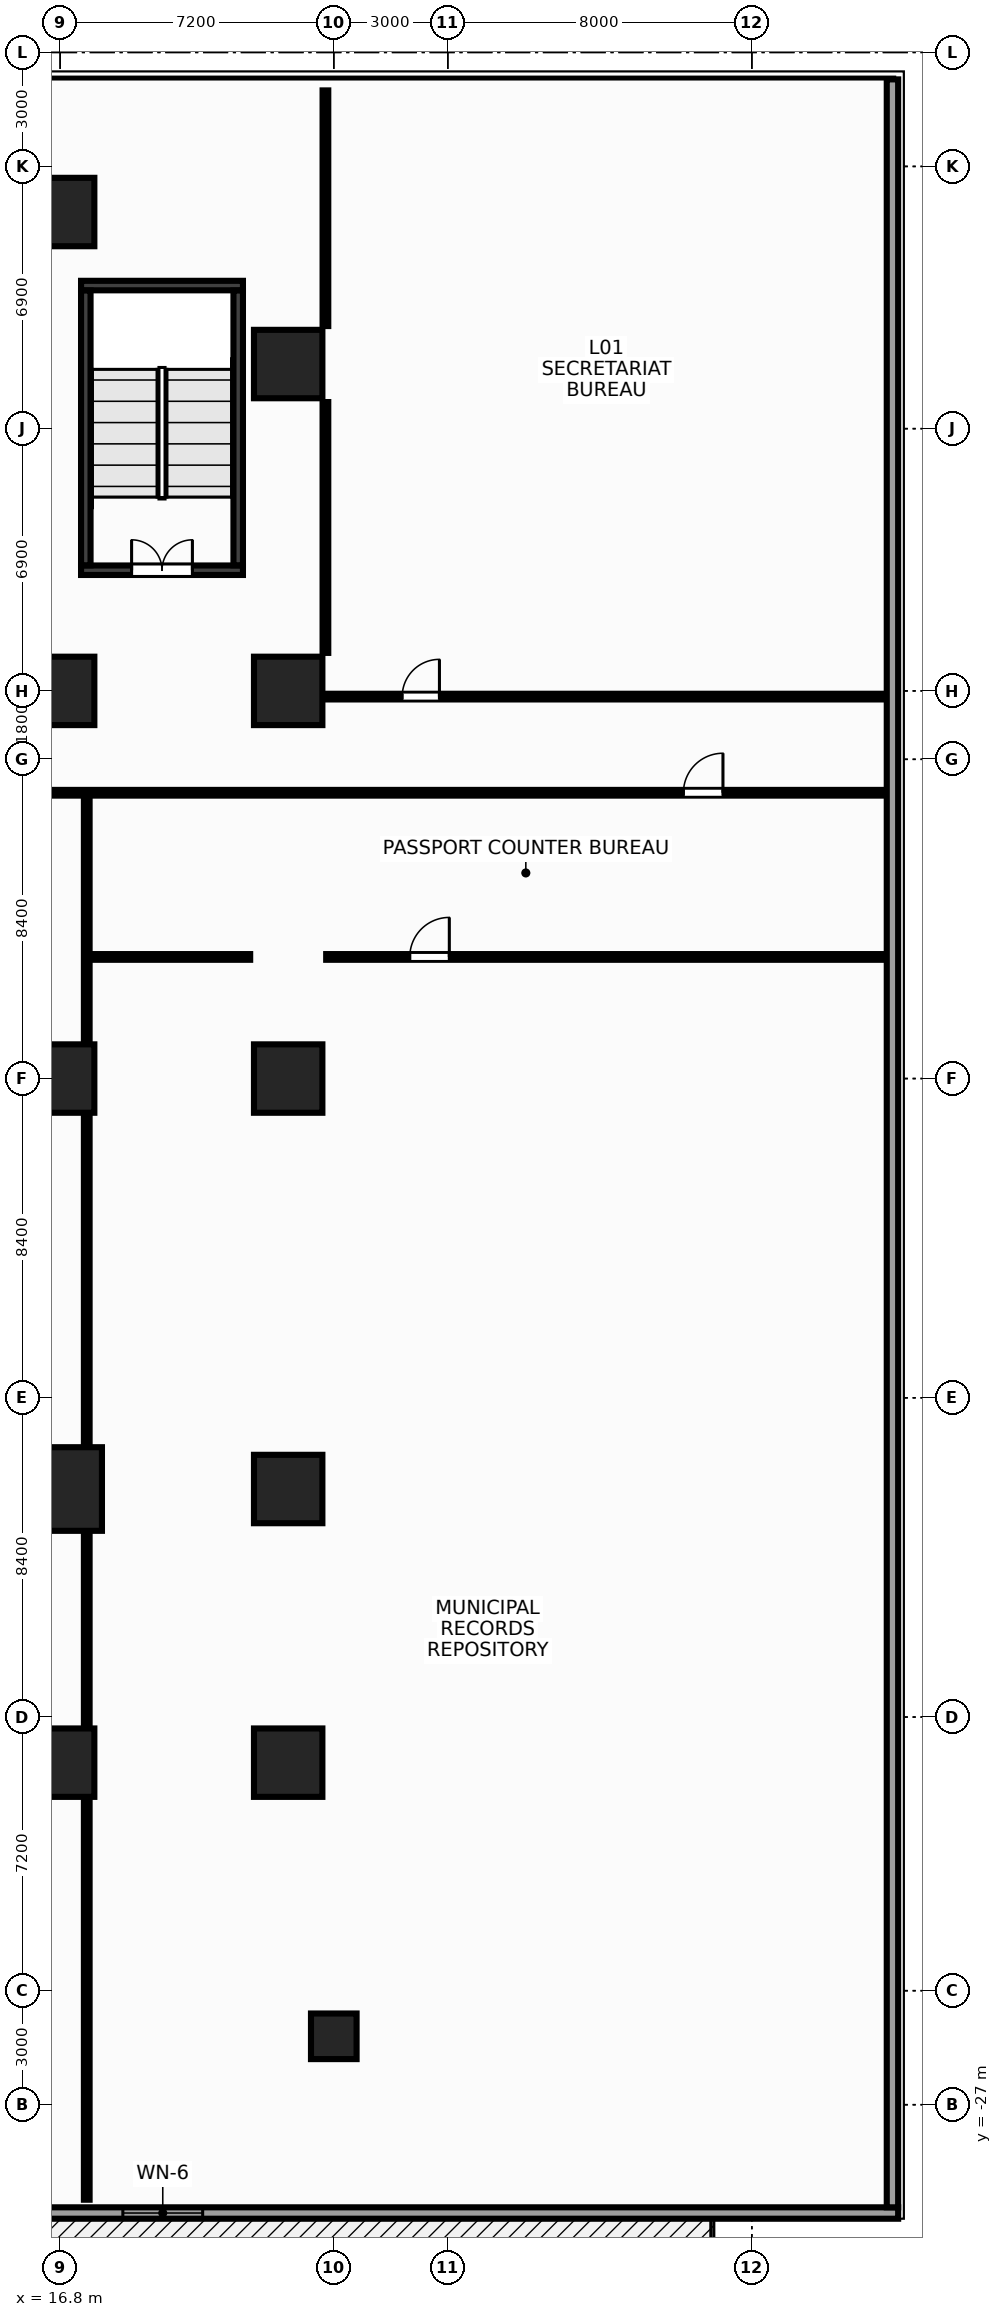
"""IFC4 building model, lengths in metres.
Left out: names, types, materials, properties, quantities, classifications, styles, units other than length and angle.
Written with IfcOpenShell. Run it as: python <this file> out.ifc"""

import sys

from ifc_helpers import new_model, si_unit, direction, frame, frame_2d, origin, origin_2d, place, context, subcontext, project, spatial, rectangle, hollow_rectangle, extrude, source, transform, mapped, element, fill, save


model = new_model("IFC4")
c1 = context("Model", 3, precision=1e-05, world=origin(), true_north=direction((0.0, 1.0)))
c2 = subcontext(c1, "Body", "Model", "MODEL_VIEW")
j1 = project(units=[si_unit("LENGTHUNIT", "METRE"), si_unit("PLANEANGLEUNIT", "RADIAN")], contexts=[c1])
p1 = place(None, origin())
s1 = spatial("IfcSite", under=j1, at=p1, CompositionType="ELEMENT")
p2 = place(p1, origin())
s2 = spatial("IfcBuilding", under=s1, at=p2, CompositionType="ELEMENT")
p3 = place(p2, frame((0.0, 0.0, 5.0)))
s3 = spatial("IfcBuildingStorey", under=s2, at=p3, CompositionType="ELEMENT", Elevation=5.0)
m1 = source(origin(), c2, "Body", "SweptSolid", [
    extrude(rectangle(XDim=4.26, YDim=0.25, at=frame_2d((2.13, 0.0))), origin(), (0.0, 0.0, 1.0), 4.65),
])
p4 = place(p3, frame((17.35, 20.865, 0.0), z_axis=(0.0, 0.0, 1.0), x_axis=(1.0, 0.0, 0.0)))
e1 = element("IfcWall", 1, at=p4, inside=s3, PredefinedType="SHEAR", context=c2, shape_type="MappedRepresentation", body=[
    mapped(m1, transform((0.0, 0.0, 0.0), x_axis=(1.0, 0.0, 0.0), y_axis=(0.0, 1.0, 0.0), z_axis=(0.0, 0.0, 1.0), scale=1.0)),
])
p5 = place(p3, frame((17.35, 13.375, 0.0), z_axis=(0.0, 0.0, 1.0), x_axis=(1.0, 0.0, 0.0)))
e2 = element("IfcWall", 2, at=p5, inside=s3, PredefinedType="SHEAR", context=c2, shape_type="MappedRepresentation", body=[
    mapped(m1, transform((0.0, 0.0, 0.0), x_axis=(1.0, 0.0, 0.0), y_axis=(0.0, 1.0, 0.0), z_axis=(0.0, 0.0, 1.0), scale=1.0)),
])
p6 = place(p5, frame((1.33, 0.0, 0.0)))
e3 = element("IfcOpeningElement", 3, at=p6, cuts=e2, PredefinedType="OPENING", context=c2, shape_type="SweptSolid", body=[
    extrude(rectangle(XDim=1.6, YDim=2.15, at=frame_2d((0.8, 1.075))), frame((0.0, 0.137, 0.0), z_axis=(0.0, -1.0, 0.0), x_axis=(1.0, 0.0, 0.0)), (0.0, 0.0, 1.0), 0.274),
])
m2 = source(origin(), c2, "Body", "SweptSolid", [
    extrude(rectangle(XDim=7.23, YDim=0.25, at=frame_2d((3.615, 0.0))), origin(), (0.0, 0.0, 1.0), 4.65),
])
for number, where, z_axis, x_axis in (
    (4, (17.475, 13.505, 0.0), (0.0, 0.0, 1.0), (0.0, 1.0, 0.0)),
    (5, (21.485, 13.505, 0.0), (0.0, 0.0, 1.0), (0.0, 1.0, 0.0)),
):
    element("IfcWall", number, at=place(p3, frame(where, z_axis=z_axis, x_axis=x_axis)), inside=s3, PredefinedType="SHEAR", context=c2, shape_type="MappedRepresentation", body=[
        mapped(m2, transform((0.0, 0.0, 0.0), x_axis=(1.0, 0.0, 0.0), y_axis=(0.0, 1.0, 0.0), z_axis=(0.0, 0.0, 1.0), scale=1.0)),
    ])
m3 = source(origin(), c2, "Body", "SweptSolid", [
    extrude(hollow_rectangle(XDim=1.2, YDim=1.2, WallThickness=0.055, at=origin_2d()), origin(), (0.0, 0.0, 1.0), 4.65),
])
p7 = place(p3, frame((24.0, -25.2, 0.0), z_axis=(0.0, 0.0, 1.0), x_axis=(1.0, 0.0, 0.0)))
e6 = element("IfcColumn", 6, at=p7, inside=s3, PredefinedType="COLUMN", context=c2, shape_type="MappedRepresentation", body=[
    mapped(m3, transform((0.0, 0.0, 0.0), x_axis=(1.0, 0.0, 0.0), y_axis=(0.0, 1.0, 0.0), z_axis=(0.0, 0.0, 1.0), scale=1.0)),
])
m4 = source(origin(), c2, "Body", "SweptSolid", [
    extrude(rectangle(XDim=1.8, YDim=1.8, at=origin_2d()), origin(), (0.0, 0.0, 1.0), 4.65),
])
p8 = place(p3, frame((16.8, -18.0, 0.0), z_axis=(0.0, 0.0, 1.0), x_axis=(1.0, 0.0, 0.0)))
e7 = element("IfcColumn", 7, at=p8, inside=s3, PredefinedType="COLUMN", context=c2, shape_type="MappedRepresentation", body=[
    mapped(m4, transform((0.0, 0.0, 0.0), x_axis=(1.0, 0.0, 0.0), y_axis=(0.0, 1.0, 0.0), z_axis=(0.0, 0.0, 1.0), scale=1.0)),
])
m5 = source(origin(), c2, "Body", "SweptSolid", [
    extrude(rectangle(XDim=2.2, YDim=2.2, at=origin_2d()), origin(), (0.0, 0.0, 1.0), 4.65),
])
p9 = place(p3, frame((16.8, -10.8, 0.0), z_axis=(0.0, 0.0, 1.0), x_axis=(1.0, 0.0, 0.0)))
e8 = element("IfcColumn", 8, at=p9, inside=s3, PredefinedType="COLUMN", context=c2, shape_type="MappedRepresentation", body=[
    mapped(m5, transform((0.0, 0.0, 0.0), x_axis=(1.0, 0.0, 0.0), y_axis=(0.0, 1.0, 0.0), z_axis=(0.0, 0.0, 1.0), scale=1.0)),
])
for number, where, z_axis, x_axis in (
    (9, (16.8, 0.0, 0.0), (0.0, 0.0, 1.0), (1.0, 0.0, 0.0)),
    (10, (16.8, 10.2, 0.0), (0.0, 0.0, 1.0), (1.0, 0.0, 0.0)),
    (11, (16.8, 22.8, 0.0), (0.0, 0.0, 1.0), (1.0, 0.0, 0.0)),
    (12, (22.8, -18.0, 0.0), (0.0, 0.0, 1.0), (1.0, 0.0, 0.0)),
    (13, (22.8, -10.8, 0.0), (0.0, 0.0, 1.0), (1.0, 0.0, 0.0)),
    (14, (22.8, 0.0, 0.0), (0.0, 0.0, 1.0), (1.0, 0.0, 0.0)),
    (15, (22.8, 10.2, 0.0), (0.0, 0.0, 1.0), (1.0, 0.0, 0.0)),
    (16, (22.8, 18.8, 0.0), (0.0, 0.0, 1.0), (1.0, 0.0, 0.0)),
):
    element("IfcColumn", number, at=place(p3, frame(where, z_axis=z_axis, x_axis=x_axis)), inside=s3, PredefinedType="COLUMN", context=c2, shape_type="MappedRepresentation", body=[
        mapped(m4, transform((0.0, 0.0, 0.0), x_axis=(1.0, 0.0, 0.0), y_axis=(0.0, 1.0, 0.0), z_axis=(0.0, 0.0, 1.0), scale=1.0)),
    ])
m6 = source(origin(), c2, "Body", "SweptSolid", [
    extrude(rectangle(XDim=77.7, YDim=0.3, at=frame_2d((38.85, 0.0))), origin(), (0.0, 0.0, 1.0), 3.87),
])
p10 = place(p3, frame((38.85, -29.85, 0.0), z_axis=(0.0, 0.0, 1.0), x_axis=(-1.0, 0.0, 0.0)))
e17 = element("IfcWall", 17, at=p10, inside=s3, PredefinedType="STANDARD", context=c2, shape_type="MappedRepresentation", body=[
    mapped(m6, transform((0.0, 0.0, 0.0), x_axis=(1.0, 0.0, 0.0), y_axis=(0.0, 1.0, 0.0), z_axis=(0.0, 0.0, 1.0), scale=1.0)),
])
p11 = place(p10, frame((18.3, 0.0, 0.9)))
e18 = element("IfcOpeningElement", 18, at=p11, cuts=e17, PredefinedType="OPENING", context=c2, shape_type="SweptSolid", body=[
    extrude(rectangle(XDim=2.1, YDim=2.3, at=frame_2d((1.05, 1.15))), frame((0.0, 0.162, 0.0), z_axis=(0.0, -1.0, 0.0), x_axis=(1.0, 0.0, 0.0)), (0.0, 0.0, 1.0), 0.324),
])
p12 = place(p10, frame((24.8, 0.0, 0.9)))
e19 = element("IfcOpeningElement", 19, at=p12, cuts=e17, PredefinedType="OPENING", context=c2, shape_type="SweptSolid", body=[
    extrude(rectangle(XDim=2.1, YDim=2.3, at=frame_2d((1.05, 1.15))), frame((0.0, 0.162, 0.0), z_axis=(0.0, -1.0, 0.0), x_axis=(1.0, 0.0, 0.0)), (0.0, 0.0, 1.0), 0.324),
])
p13 = place(p10, frame((50.8, 0.0, 0.9)))
e20 = element("IfcOpeningElement", 20, at=p13, cuts=e17, PredefinedType="OPENING", context=c2, shape_type="SweptSolid", body=[
    extrude(rectangle(XDim=2.1, YDim=2.3, at=frame_2d((1.05, 1.15))), frame((0.0, 0.162, 0.0), z_axis=(0.0, -1.0, 0.0), x_axis=(1.0, 0.0, 0.0)), (0.0, 0.0, 1.0), 0.324),
])
p14 = place(p10, frame((57.3, 0.0, 0.9)))
e21 = element("IfcOpeningElement", 21, at=p14, cuts=e17, PredefinedType="OPENING", context=c2, shape_type="SweptSolid", body=[
    extrude(rectangle(XDim=2.1, YDim=2.3, at=frame_2d((1.05, 1.15))), frame((0.0, 0.162, 0.0), z_axis=(0.0, -1.0, 0.0), x_axis=(1.0, 0.0, 0.0)), (0.0, 0.0, 1.0), 0.324),
])
p15 = place(p10, frame((34.35, 0.0, 0.0)))
e22 = element("IfcOpeningElement", 22, at=p15, cuts=e17, PredefinedType="OPENING", context=c2, shape_type="SweptSolid", body=[
    extrude(rectangle(XDim=1.8, YDim=2.2, at=frame_2d((0.9, 1.1))), frame((0.0, 0.162, 0.0), z_axis=(0.0, -1.0, 0.0), x_axis=(1.0, 0.0, 0.0)), (0.0, 0.0, 1.0), 0.324),
])
p16 = place(p10, frame((42.35, 0.0, 0.0)))
e23 = element("IfcOpeningElement", 23, at=p16, cuts=e17, PredefinedType="OPENING", context=c2, shape_type="SweptSolid", body=[
    extrude(rectangle(XDim=1.8, YDim=2.2, at=frame_2d((0.9, 1.1))), frame((0.0, 0.162, 0.0), z_axis=(0.0, -1.0, 0.0), x_axis=(1.0, 0.0, 0.0)), (0.0, 0.0, 1.0), 0.324),
])
m7 = source(origin(), c2, "Body", "SweptSolid", [
    extrude(rectangle(XDim=55.99, YDim=0.3, at=frame_2d((27.995, 0.0))), origin(), (0.0, 0.0, 1.0), 3.87),
])
p17 = place(p3, frame((38.7, 26.29, 0.0), z_axis=(0.0, 0.0, 1.0), x_axis=(0.0, -1.0, 0.0)))
e24 = element("IfcWall", 24, at=p17, inside=s3, PredefinedType="STANDARD", context=c2, shape_type="MappedRepresentation", body=[
    mapped(m7, transform((0.0, 0.0, 0.0), x_axis=(1.0, 0.0, 0.0), y_axis=(0.0, 1.0, 0.0), z_axis=(0.0, 0.0, 1.0), scale=1.0)),
])
m8 = source(origin(), c2, "Body", "SweptSolid", [
    extrude(rectangle(XDim=77.0, YDim=0.15, at=frame_2d((38.5, 0.0))), origin(), (0.0, 0.0, 1.0), 3.755),
])
p18 = place(p3, frame((-38.5, 7.52, 0.0), z_axis=(0.0, 0.0, 1.0), x_axis=(1.0, 0.0, 0.0)))
e25 = element("IfcWall", 25, at=p18, inside=s3, PredefinedType="PARTITIONING", context=c2, shape_type="MappedRepresentation", body=[
    mapped(m8, transform((0.0, 0.0, 0.0), x_axis=(1.0, 0.0, 0.0), y_axis=(0.0, 1.0, 0.0), z_axis=(0.0, 0.0, 1.0), scale=1.0)),
])
p19 = place(p18, frame((4.2, 0.0, 0.0)))
e26 = element("IfcOpeningElement", 26, at=p19, cuts=e25, PredefinedType="OPENING", context=c2, shape_type="SweptSolid", body=[
    extrude(rectangle(XDim=1.04, YDim=2.2, at=frame_2d((0.52, 1.1))), frame((0.0, 0.087, 0.0), z_axis=(0.0, -1.0, 0.0), x_axis=(1.0, 0.0, 0.0)), (0.0, 0.0, 1.0), 0.174),
])
p20 = place(p18, frame((37.7, 0.0, 0.0)))
e27 = element("IfcOpeningElement", 27, at=p20, cuts=e25, PredefinedType="OPENING", context=c2, shape_type="SweptSolid", body=[
    extrude(rectangle(XDim=1.65, YDim=2.35, at=frame_2d((0.825, 1.175))), frame((0.0, 0.087, 0.0), z_axis=(0.0, -1.0, 0.0), x_axis=(1.0, 0.0, 0.0)), (0.0, 0.0, 1.0), 0.174),
])
p21 = place(p18, frame((71.7, 0.0, 0.0)))
e28 = element("IfcOpeningElement", 28, at=p21, cuts=e25, PredefinedType="OPENING", context=c2, shape_type="SweptSolid", body=[
    extrude(rectangle(XDim=1.04, YDim=2.2, at=frame_2d((0.52, 1.1))), frame((0.0, 0.087, 0.0), z_axis=(0.0, -1.0, 0.0), x_axis=(1.0, 0.0, 0.0)), (0.0, 0.0, 1.0), 0.174),
])
m9 = source(origin(), c2, "Body", "SweptSolid", [
    extrude(rectangle(XDim=14.7, YDim=0.15, at=frame_2d((7.35, 0.0))), origin(), (0.0, 0.0, 1.0), 4.37),
])
p22 = place(p3, frame((23.8, 10.05, 0.0), z_axis=(0.0, 0.0, 1.0), x_axis=(1.0, 0.0, 0.0)))
e29 = element("IfcWall", 29, at=p22, inside=s3, PredefinedType="PARTITIONING", context=c2, shape_type="MappedRepresentation", body=[
    mapped(m9, transform((0.0, 0.0, 0.0), x_axis=(1.0, 0.0, 0.0), y_axis=(0.0, 1.0, 0.0), z_axis=(0.0, 0.0, 1.0), scale=1.0)),
])
p23 = place(p22, frame((2.0, 0.0, 0.0)))
e30 = element("IfcOpeningElement", 30, at=p23, cuts=e29, PredefinedType="OPENING", context=c2, shape_type="SweptSolid", body=[
    extrude(rectangle(XDim=0.98, YDim=2.15, at=frame_2d((0.49, 1.075))), frame((0.0, 0.087, 0.0), z_axis=(0.0, -1.0, 0.0), x_axis=(1.0, 0.0, 0.0)), (0.0, 0.0, 1.0), 0.174),
])
m10 = source(origin(), c2, "Body", "SweptSolid", [
    extrude(rectangle(XDim=6.6, YDim=0.15, at=frame_2d((3.3, 0.0))), origin(), (0.0, 0.0, 1.0), 4.37),
])
p24 = place(p3, frame((23.78, 11.2, 0.0), z_axis=(0.0, 0.0, 1.0), x_axis=(0.0, 1.0, 0.0)))
e31 = element("IfcWall", 31, at=p24, inside=s3, PredefinedType="PARTITIONING", context=c2, shape_type="MappedRepresentation", body=[
    mapped(m10, transform((0.0, 0.0, 0.0), x_axis=(1.0, 0.0, 0.0), y_axis=(0.0, 1.0, 0.0), z_axis=(0.0, 0.0, 1.0), scale=1.0)),
])
m11 = source(origin(), c2, "Body", "SweptSolid", [
    extrude(rectangle(XDim=6.2, YDim=0.15, at=frame_2d((3.1, 0.0))), origin(), (0.0, 0.0, 1.0), 4.37),
])
p25 = place(p3, frame((23.78, 19.8, 0.0), z_axis=(0.0, 0.0, 1.0), x_axis=(0.0, 1.0, 0.0)))
e32 = element("IfcWall", 32, at=p25, inside=s3, PredefinedType="PARTITIONING", context=c2, shape_type="MappedRepresentation", body=[
    mapped(m11, transform((0.0, 0.0, 0.0), x_axis=(1.0, 0.0, 0.0), y_axis=(0.0, 1.0, 0.0), z_axis=(0.0, 0.0, 1.0), scale=1.0)),
])
m12 = source(origin(), c2, "Body", "SweptSolid", [
    extrude(rectangle(XDim=36.88, YDim=0.15, at=frame_2d((18.44, 0.0))), origin(), (0.0, 0.0, 1.0), 3.655),
])
p26 = place(p3, frame((17.5, -29.5, 0.0), z_axis=(0.0, 0.0, 1.0), x_axis=(0.0, 1.0, 0.0)))
e33 = element("IfcWall", 33, at=p26, inside=s3, PredefinedType="PARTITIONING", context=c2, shape_type="MappedRepresentation", body=[
    mapped(m12, transform((0.0, 0.0, 0.0), x_axis=(1.0, 0.0, 0.0), y_axis=(0.0, 1.0, 0.0), z_axis=(0.0, 0.0, 1.0), scale=1.0)),
])
m13 = source(origin(), c2, "Body", "SweptSolid", [
    extrude(rectangle(XDim=4.18, YDim=0.15, at=frame_2d((2.09, 0.0))), origin(), (0.0, 0.0, 1.0), 4.37),
])
p27 = place(p3, frame((17.62, 3.2, 0.0), z_axis=(0.0, 0.0, 1.0), x_axis=(1.0, 0.0, 0.0)))
e34 = element("IfcWall", 34, at=p27, inside=s3, PredefinedType="PARTITIONING", context=c2, shape_type="MappedRepresentation", body=[
    mapped(m13, transform((0.0, 0.0, 0.0), x_axis=(1.0, 0.0, 0.0), y_axis=(0.0, 1.0, 0.0), z_axis=(0.0, 0.0, 1.0), scale=1.0)),
])
p28 = place(p3, frame((23.8, 3.2, 0.0), z_axis=(0.0, 0.0, 1.0), x_axis=(1.0, 0.0, 0.0)))
e35 = element("IfcWall", 35, at=p28, inside=s3, PredefinedType="PARTITIONING", context=c2, shape_type="MappedRepresentation", body=[
    mapped(m9, transform((0.0, 0.0, 0.0), x_axis=(1.0, 0.0, 0.0), y_axis=(0.0, 1.0, 0.0), z_axis=(0.0, 0.0, 1.0), scale=1.0)),
])
p29 = place(p28, frame((2.2, 0.0, 0.0)))
e36 = element("IfcOpeningElement", 36, at=p29, cuts=e35, PredefinedType="OPENING", context=c2, shape_type="SweptSolid", body=[
    extrude(rectangle(XDim=1.04, YDim=2.2, at=frame_2d((0.52, 1.1))), frame((0.0, 0.087, 0.0), z_axis=(0.0, -1.0, 0.0), x_axis=(1.0, 0.0, 0.0)), (0.0, 0.0, 1.0), 0.174),
])
m14 = source(origin(), c2, "Body", "SweptSolid", [
    extrude(rectangle(XDim=2.1, YDim=2.3, at=frame_2d((1.05, 1.15))), frame((0.0, 0.03, 0.0), z_axis=(0.0, -1.0, 0.0), x_axis=(1.0, 0.0, 0.0)), (0.0, 0.0, 1.0), 0.06),
])
p30 = place(p11, origin())
e37 = element("IfcWindow", 37, at=p30, inside=s3, PartitioningType="SINGLE_PANEL", PredefinedType="WINDOW", context=c2, shape_type="MappedRepresentation", body=[
    mapped(m14, transform((0.0, 0.0, 0.0), x_axis=(1.0, 0.0, 0.0), y_axis=(0.0, 1.0, 0.0), z_axis=(0.0, 0.0, 1.0), scale=1.0)),
])
fill(e18, e37)
m15 = source(origin(), c2, "Body", "SweptSolid", [
    extrude(rectangle(XDim=1.6, YDim=2.15, at=frame_2d((0.8, 1.075))), frame((0.0, 0.025, 0.0), z_axis=(0.0, -1.0, 0.0), x_axis=(1.0, 0.0, 0.0)), (0.0, 0.0, 1.0), 0.05),
])
p31 = place(p6, origin())
e38 = element("IfcDoor", 38, at=p31, inside=s3, OperationType="DOUBLE_DOOR_SINGLE_SWING", PredefinedType="DOOR", context=c2, shape_type="MappedRepresentation", body=[
    mapped(m15, transform((0.0, 0.0, 0.0), x_axis=(1.0, 0.0, 0.0), y_axis=(0.0, 1.0, 0.0), z_axis=(0.0, 0.0, 1.0), scale=1.0)),
])
fill(e3, e38)
m16 = source(origin(), c2, "Body", "SweptSolid", [
    extrude(rectangle(XDim=1.04, YDim=2.2, at=frame_2d((0.52, 1.1))), frame((0.0, 0.025, 0.0), z_axis=(0.0, -1.0, 0.0), x_axis=(1.0, 0.0, 0.0)), (0.0, 0.0, 1.0), 0.05),
])
p32 = place(p21, origin())
e39 = element("IfcDoor", 39, at=p32, inside=s3, OperationType="SINGLE_SWING_RIGHT", PredefinedType="DOOR", context=c2, shape_type="MappedRepresentation", body=[
    mapped(m16, transform((0.0, 0.0, 0.0), x_axis=(1.0, 0.0, 0.0), y_axis=(0.0, 1.0, 0.0), z_axis=(0.0, 0.0, 1.0), scale=1.0)),
])
fill(e28, e39)
p33 = place(p29, origin())
e40 = element("IfcDoor", 40, at=p33, inside=s3, OperationType="SINGLE_SWING_RIGHT", PredefinedType="DOOR", context=c2, shape_type="MappedRepresentation", body=[
    mapped(m16, transform((0.0, 0.0, 0.0), x_axis=(1.0, 0.0, 0.0), y_axis=(0.0, 1.0, 0.0), z_axis=(0.0, 0.0, 1.0), scale=1.0)),
])
fill(e36, e40)
m17 = source(origin(), c2, "Body", "SweptSolid", [
    extrude(rectangle(XDim=0.98, YDim=2.15, at=frame_2d((0.49, 1.075))), frame((0.0, 0.025, 0.0), z_axis=(0.0, -1.0, 0.0), x_axis=(1.0, 0.0, 0.0)), (0.0, 0.0, 1.0), 0.05),
])
p34 = place(p23, origin())
e41 = element("IfcDoor", 41, at=p34, inside=s3, OperationType="SINGLE_SWING_RIGHT", PredefinedType="DOOR", context=c2, shape_type="MappedRepresentation", body=[
    mapped(m17, transform((0.0, 0.0, 0.0), x_axis=(1.0, 0.0, 0.0), y_axis=(0.0, 1.0, 0.0), z_axis=(0.0, 0.0, 1.0), scale=1.0)),
])
fill(e30, e41)
save(model, sys.argv[1])
